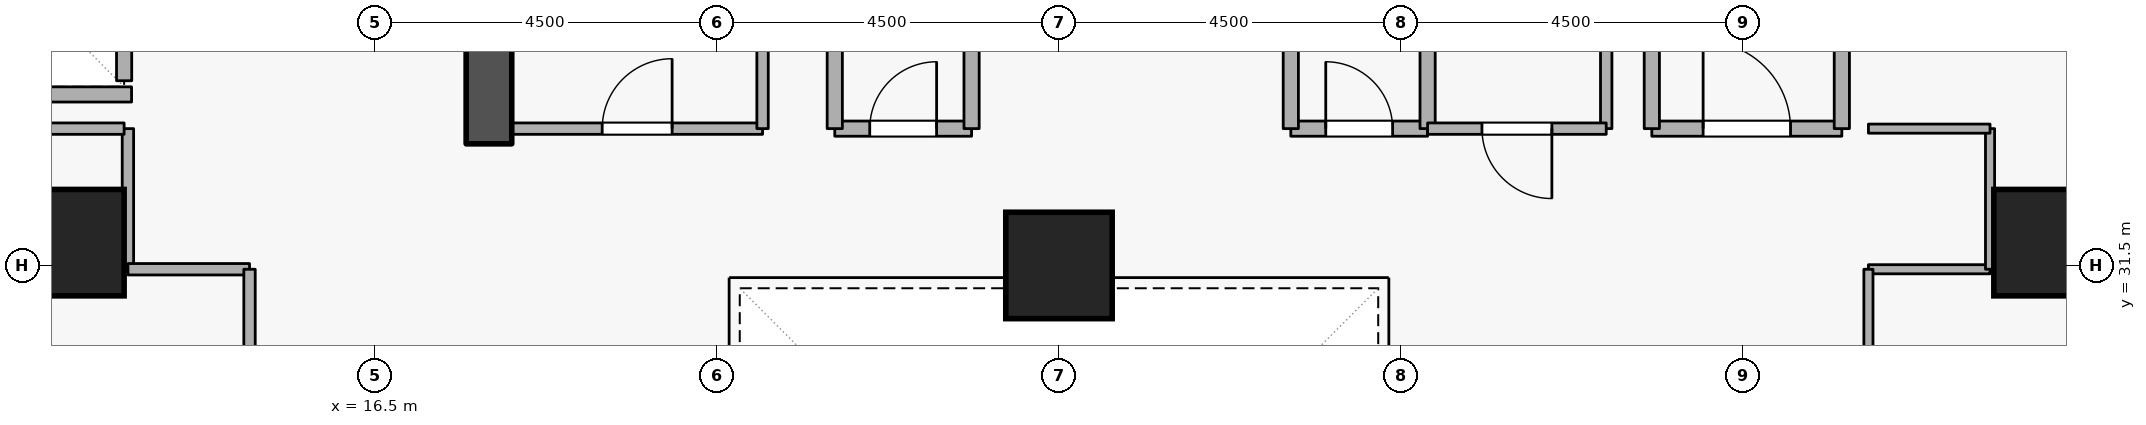
"""IFC4 building model, lengths in metres.
Left out: names, types, materials, properties, quantities, classifications, styles, units other than length and angle.
Written with IfcOpenShell. Run it as: python <this file> out.ifc"""

import sys

from ifc_helpers import new_model, si_unit, direction, frame, frame_2d, origin, origin_2d, place, context, subcontext, project, spatial, rectangle, extrude, element, fill, save


model = new_model("IFC4")
c1 = context("Model", 3, precision=1e-05, world=origin(), true_north=direction((0.0, 1.0)))
c2 = subcontext(c1, "Body", "Model", "MODEL_VIEW")
j1 = project(units=[si_unit("LENGTHUNIT", "METRE"), si_unit("PLANEANGLEUNIT", "RADIAN")], contexts=[c1])
p1 = place(None, origin())
s1 = spatial("IfcSite", under=j1, at=p1, CompositionType="ELEMENT")
p2 = place(p1, origin())
s2 = spatial("IfcBuilding", under=s1, at=p2, CompositionType="ELEMENT")
p3 = place(p2, frame((0.0, 0.0, 27.9)))
s3 = spatial("IfcBuildingStorey", under=s2, at=p3, CompositionType="ELEMENT", Elevation=27.9)
p4 = place(p3, frame((18.0, 33.1, 0.0), z_axis=(0.0, 0.0, 1.0), x_axis=(0.0, 1.0, 0.0)))
e1 = element("IfcWall", 1, at=p4, inside=s3, PredefinedType="SHEAR", context=c2, shape_type="SweptSolid", body=[
    extrude(rectangle(XDim=5.7, YDim=0.6, at=frame_2d((2.85, 0.0))), origin(), (0.0, 0.0, 1.0), 3.6),
])
for number, where, z_axis, x_axis in (
    (2, (12.5, 31.8, 0.0), (0.0, 0.0, 1.0), (1.0, 0.0, 0.0)),
    (3, (38.5, 31.8, 0.0), (0.0, 0.0, 1.0), (1.0, 0.0, 0.0)),
    (4, (25.5, 31.5, 0.0), (0.0, 0.0, 1.0), (1.0, 0.0, 0.0)),
):
    element("IfcColumn", number, at=place(p3, frame(where, z_axis=z_axis, x_axis=x_axis)), inside=s3, PredefinedType="COLUMN", context=c2, shape_type="SweptSolid", body=[
        extrude(rectangle(XDim=1.4, YDim=1.4, at=origin_2d()), origin(), (0.0, 0.0, 1.0), 3.6),
    ])
p5 = place(p3, frame((13.2, 33.93, 0.0), z_axis=(0.0, 0.0, 1.0), x_axis=(0.0, 1.0, 0.0)))
e5 = element("IfcWall", 5, at=p5, inside=s3, PredefinedType="STANDARD", context=c2, shape_type="SweptSolid", body=[
    extrude(rectangle(XDim=1.94, YDim=0.2, at=frame_2d((0.97, 0.0))), origin(), (0.0, 0.0, 1.0), 3.34),
])
p6 = place(p3, frame((11.002, 33.75, 0.0), z_axis=(0.0, 0.0, 1.0), x_axis=(1.0, 0.0, 0.0)))
e6 = element("IfcWall", 6, at=p6, inside=s3, PredefinedType="STANDARD", context=c2, shape_type="SweptSolid", body=[
    extrude(rectangle(XDim=2.296, YDim=0.2, at=frame_2d((1.148, 0.0))), origin(), (0.0, 0.0, 1.0), 3.34),
])
p7 = place(p3, frame((33.3, 33.3, 0.0), z_axis=(0.0, 0.0, 1.0), x_axis=(1.0, 0.0, 0.0)))
e7 = element("IfcWall", 7, at=p7, inside=s3, PredefinedType="STANDARD", context=c2, shape_type="SweptSolid", body=[
    extrude(rectangle(XDim=2.5, YDim=0.2, at=frame_2d((1.25, 0.0))), origin(), (0.0, 0.0, 1.0), 3.34),
])
p8 = place(p7, frame((0.675, 0.0, 0.0)))
e8 = element("IfcOpeningElement", 8, at=p8, cuts=e7, PredefinedType="OPENING", context=c2, shape_type="SweptSolid", body=[
    extrude(rectangle(XDim=1.15, YDim=2.1, at=frame_2d((0.575, 1.05))), frame((0.0, 0.11, 0.0), z_axis=(0.0, -1.0, 0.0), x_axis=(1.0, 0.0, 0.0)), (0.0, 0.0, 1.0), 0.22),
])
p9 = place(p3, frame((35.8, 33.3, 0.0), z_axis=(0.0, 0.0, 1.0), x_axis=(0.0, 1.0, 0.0)))
e9 = element("IfcWall", 9, at=p9, inside=s3, PredefinedType="STANDARD", context=c2, shape_type="SweptSolid", body=[
    extrude(rectangle(XDim=5.7, YDim=0.2, at=frame_2d((2.85, 0.0))), origin(), (0.0, 0.0, 1.0), 3.34),
])
p10 = place(p3, frame((33.3, 35.6, 0.0), z_axis=(0.0, 0.0, 1.0), x_axis=(0.0, -1.0, 0.0)))
e10 = element("IfcWall", 10, at=p10, inside=s3, PredefinedType="STANDARD", context=c2, shape_type="SweptSolid", body=[
    extrude(rectangle(XDim=2.3, YDim=0.2, at=frame_2d((1.15, 0.0))), origin(), (0.0, 0.0, 1.0), 2.545),
])
p11 = place(p3, frame((22.55, 33.3, 0.0), z_axis=(0.0, 0.0, 1.0), x_axis=(1.0, 0.0, 0.0)))
e11 = element("IfcWall", 11, at=p11, inside=s3, PredefinedType="STANDARD", context=c2, shape_type="SweptSolid", body=[
    extrude(rectangle(XDim=1.8, YDim=0.2, at=frame_2d((0.9, 0.0))), origin(), (0.0, 0.0, 1.0), 3.34),
])
p12 = place(p11, frame((0.46, 0.0, 0.0)))
e12 = element("IfcOpeningElement", 12, at=p12, cuts=e11, PredefinedType="OPENING", context=c2, shape_type="SweptSolid", body=[
    extrude(rectangle(XDim=0.88, YDim=2.04, at=frame_2d((0.44, 1.02))), frame((0.0, 0.11, 0.0), z_axis=(0.0, -1.0, 0.0), x_axis=(1.0, 0.0, 0.0)), (0.0, 0.0, 1.0), 0.22),
])
for number, where, z_axis, x_axis in (
    (13, (24.35, 33.3, 0.0), (0.0, 0.0, 1.0), (0.0, 1.0, 0.0)),
    (14, (22.55, 35.35, 0.0), (0.0, 0.0, 1.0), (0.0, -1.0, 0.0)),
):
    element("IfcWall", number, at=place(p3, frame(where, z_axis=z_axis, x_axis=x_axis)), inside=s3, PredefinedType="STANDARD", context=c2, shape_type="SweptSolid", body=[
        extrude(rectangle(XDim=2.05, YDim=0.2, at=frame_2d((1.025, 0.0))), origin(), (0.0, 0.0, 1.0), 3.34),
    ])
p13 = place(p3, frame((28.55, 33.3, 0.0), z_axis=(0.0, 0.0, 1.0), x_axis=(1.0, 0.0, 0.0)))
e15 = element("IfcWall", 15, at=p13, inside=s3, PredefinedType="STANDARD", context=c2, shape_type="SweptSolid", body=[
    extrude(rectangle(XDim=1.8, YDim=0.2, at=frame_2d((0.9, 0.0))), origin(), (0.0, 0.0, 1.0), 3.34),
])
p14 = place(p13, frame((0.46, 0.0, 0.0)))
e16 = element("IfcOpeningElement", 16, at=p14, cuts=e15, PredefinedType="OPENING", context=c2, shape_type="SweptSolid", body=[
    extrude(rectangle(XDim=0.88, YDim=2.04, at=frame_2d((0.44, 1.02))), frame((0.0, 0.11, 0.0), z_axis=(0.0, -1.0, 0.0), x_axis=(1.0, 0.0, 0.0)), (0.0, 0.0, 1.0), 0.22),
])
for number, where, z_axis, x_axis in (
    (17, (30.35, 33.3, 0.0), (0.0, 0.0, 1.0), (0.0, 1.0, 0.0)),
    (18, (28.55, 35.35, 0.0), (0.0, 0.0, 1.0), (0.0, -1.0, 0.0)),
):
    element("IfcWall", number, at=place(p3, frame(where, z_axis=z_axis, x_axis=x_axis)), inside=s3, PredefinedType="STANDARD", context=c2, shape_type="SweptSolid", body=[
        extrude(rectangle(XDim=2.05, YDim=0.2, at=frame_2d((1.025, 0.0))), origin(), (0.0, 0.0, 1.0), 3.34),
    ])
p15 = place(p3, frame((18.3, 33.3, 0.0), z_axis=(0.0, 0.0, 1.0), x_axis=(1.0, 0.0, 0.0)))
e19 = element("IfcWall", 19, at=p15, inside=s3, PredefinedType="PARTITIONING", context=c2, shape_type="SweptSolid", body=[
    extrude(rectangle(XDim=3.3, YDim=0.15, at=frame_2d((1.65, 0.0))), origin(), (0.0, 0.0, 1.0), 3.34),
])
p16 = place(p15, frame((1.19, 0.0, 0.0)))
e20 = element("IfcOpeningElement", 20, at=p16, cuts=e19, PredefinedType="OPENING", context=c2, shape_type="SweptSolid", body=[
    extrude(rectangle(XDim=0.92, YDim=2.08, at=frame_2d((0.46, 1.04))), frame((0.0, 0.085, 0.0), z_axis=(0.0, -1.0, 0.0), x_axis=(1.0, 0.0, 0.0)), (0.0, 0.0, 1.0), 0.17),
])
p17 = place(p3, frame((21.6, 33.3, 0.0), z_axis=(0.0, 0.0, 1.0), x_axis=(0.0, 1.0, 0.0)))
e21 = element("IfcWall", 21, at=p17, inside=s3, PredefinedType="PARTITIONING", context=c2, shape_type="SweptSolid", body=[
    extrude(rectangle(XDim=2.05, YDim=0.15, at=frame_2d((1.025, 0.0))), origin(), (0.0, 0.0, 1.0), 3.34),
])
p18 = place(p3, frame((32.7, 35.35, 0.0), z_axis=(0.0, 0.0, 1.0), x_axis=(0.0, -1.0, 0.0)))
e22 = element("IfcWall", 22, at=p18, inside=s3, PredefinedType="PARTITIONING", context=c2, shape_type="SweptSolid", body=[
    extrude(rectangle(XDim=2.05, YDim=0.15, at=frame_2d((1.025, 0.0))), origin(), (0.0, 0.0, 1.0), 2.545),
])
p19 = place(p3, frame((32.7, 33.3, 0.0), z_axis=(0.0, 0.0, 1.0), x_axis=(-1.0, 0.0, 0.0)))
e23 = element("IfcWall", 23, at=p19, inside=s3, PredefinedType="PARTITIONING", context=c2, shape_type="SweptSolid", body=[
    extrude(rectangle(XDim=2.35, YDim=0.15, at=frame_2d((1.175, 0.0))), origin(), (0.0, 0.0, 1.0), 3.34),
])
p20 = place(p19, frame((0.715, 0.0, 0.0)))
e24 = element("IfcOpeningElement", 24, at=p20, cuts=e23, PredefinedType="OPENING", context=c2, shape_type="SweptSolid", body=[
    extrude(rectangle(XDim=0.92, YDim=2.08, at=frame_2d((0.46, 1.04))), frame((0.0, 0.085, 0.0), z_axis=(0.0, -1.0, 0.0), x_axis=(1.0, 0.0, 0.0)), (0.0, 0.0, 1.0), 0.17),
])
p21 = place(p3, frame((13.25, 33.3, 0.0), z_axis=(0.0, 0.0, 1.0), x_axis=(0.0, -1.0, 0.0)))
e25 = element("IfcWall", 25, at=p21, inside=s3, PredefinedType="PARTITIONING", context=c2, shape_type="SweptSolid", body=[
    extrude(rectangle(XDim=1.85, YDim=0.15, at=frame_2d((0.925, 0.0))), origin(), (0.0, 0.0, 1.0), 3.34),
])
p22 = place(p3, frame((13.25, 31.45, 0.0), z_axis=(0.0, 0.0, 1.0), x_axis=(1.0, 0.0, 0.0)))
e26 = element("IfcWall", 26, at=p22, inside=s3, PredefinedType="PARTITIONING", context=c2, shape_type="SweptSolid", body=[
    extrude(rectangle(XDim=1.6, YDim=0.15, at=frame_2d((0.8, 0.0))), origin(), (0.0, 0.0, 1.0), 3.34),
])
p23 = place(p3, frame((14.85, 31.45, 0.0), z_axis=(0.0, 0.0, 1.0), x_axis=(0.0, -1.0, 0.0)))
e27 = element("IfcWall", 27, at=p23, inside=s3, PredefinedType="PARTITIONING", context=c2, shape_type="SweptSolid", body=[
    extrude(rectangle(XDim=4.45, YDim=0.15, at=frame_2d((2.225, 0.0))), origin(), (0.0, 0.0, 1.0), 3.34),
])
p24 = place(p23, frame((1.575, 0.0, 0.0)))
e28 = element("IfcOpeningElement", 28, at=p24, cuts=e27, PredefinedType="OPENING", context=c2, shape_type="SweptSolid", body=[
    extrude(rectangle(XDim=1.3, YDim=2.12, at=frame_2d((0.65, 1.06))), frame((0.0, 0.085, 0.0), z_axis=(0.0, -1.0, 0.0), x_axis=(1.0, 0.0, 0.0)), (0.0, 0.0, 1.0), 0.17),
])
p25 = place(p3, frame((10.9, 33.3, 0.0), z_axis=(0.0, 0.0, 1.0), x_axis=(1.0, 0.0, 0.0)))
e29 = element("IfcWall", 29, at=p25, inside=s3, PredefinedType="PARTITIONING", context=c2, shape_type="SweptSolid", body=[
    extrude(rectangle(XDim=2.3, YDim=0.15, at=frame_2d((1.15, 0.0))), origin(), (0.0, 0.0, 1.0), 3.34),
])
p26 = place(p3, frame((36.15, 31.45, 0.0), z_axis=(0.0, 0.0, 1.0), x_axis=(1.0, 0.0, 0.0)))
e30 = element("IfcWall", 30, at=p26, inside=s3, PredefinedType="PARTITIONING", context=c2, shape_type="SweptSolid", body=[
    extrude(rectangle(XDim=1.6, YDim=0.12, at=frame_2d((0.8, 0.0))), origin(), (0.0, 0.0, 1.0), 3.34),
])
p27 = place(p3, frame((37.75, 31.45, 0.0), z_axis=(0.0, 0.0, 1.0), x_axis=(0.0, 1.0, 0.0)))
e31 = element("IfcWall", 31, at=p27, inside=s3, PredefinedType="PARTITIONING", context=c2, shape_type="SweptSolid", body=[
    extrude(rectangle(XDim=1.85, YDim=0.12, at=frame_2d((0.925, 0.0))), origin(), (0.0, 0.0, 1.0), 3.34),
])
p28 = place(p3, frame((37.75, 33.3, 0.0), z_axis=(0.0, 0.0, 1.0), x_axis=(-1.0, 0.0, 0.0)))
e32 = element("IfcWall", 32, at=p28, inside=s3, PredefinedType="PARTITIONING", context=c2, shape_type="SweptSolid", body=[
    extrude(rectangle(XDim=1.6, YDim=0.12, at=frame_2d((0.8, 0.0))), origin(), (0.0, 0.0, 1.0), 3.34),
])
p29 = place(p3, frame((36.15, 27.0, 0.0), z_axis=(0.0, 0.0, 1.0), x_axis=(0.0, 1.0, 0.0)))
e33 = element("IfcWall", 33, at=p29, inside=s3, PredefinedType="PARTITIONING", context=c2, shape_type="SweptSolid", body=[
    extrude(rectangle(XDim=4.45, YDim=0.12, at=frame_2d((2.225, 0.0))), origin(), (0.0, 0.0, 1.0), 3.34),
])
p30 = place(p29, frame((1.7, 0.0, 0.0)))
e34 = element("IfcOpeningElement", 34, at=p30, cuts=e33, PredefinedType="OPENING", context=c2, shape_type="SweptSolid", body=[
    extrude(rectangle(XDim=1.05, YDim=2.1, at=frame_2d((0.525, 1.05))), frame((0.0, 0.07, 0.0), z_axis=(0.0, -1.0, 0.0), x_axis=(1.0, 0.0, 0.0)), (0.0, 0.0, 1.0), 0.14),
])
p31 = place(p8, origin())
e35 = element("IfcDoor", 35, at=p31, inside=s3, OperationType="SINGLE_SWING_LEFT", PredefinedType="DOOR", context=c2, shape_type="SweptSolid", body=[
    extrude(rectangle(XDim=1.15, YDim=2.1, at=frame_2d((0.575, 1.05))), frame((0.0, 0.025, 0.0), z_axis=(0.0, -1.0, 0.0), x_axis=(1.0, 0.0, 0.0)), (0.0, 0.0, 1.0), 0.05),
])
fill(e8, e35)
p32 = place(p12, origin())
e36 = element("IfcDoor", 36, at=p32, inside=s3, OperationType="SINGLE_SWING_RIGHT", PredefinedType="DOOR", context=c2, shape_type="SweptSolid", body=[
    extrude(rectangle(XDim=0.88, YDim=2.04, at=frame_2d((0.44, 1.02))), frame((0.0, 0.025, 0.0), z_axis=(0.0, -1.0, 0.0), x_axis=(1.0, 0.0, 0.0)), (0.0, 0.0, 1.0), 0.05),
])
fill(e12, e36)
p33 = place(p14, origin())
e37 = element("IfcDoor", 37, at=p33, inside=s3, OperationType="SINGLE_SWING_LEFT", PredefinedType="DOOR", context=c2, shape_type="SweptSolid", body=[
    extrude(rectangle(XDim=0.88, YDim=2.04, at=frame_2d((0.44, 1.02))), frame((0.0, 0.025, 0.0), z_axis=(0.0, -1.0, 0.0), x_axis=(1.0, 0.0, 0.0)), (0.0, 0.0, 1.0), 0.05),
])
fill(e16, e37)
p34 = place(p16, origin())
e38 = element("IfcDoor", 38, at=p34, inside=s3, OperationType="SINGLE_SWING_RIGHT", PredefinedType="DOOR", context=c2, shape_type="SweptSolid", body=[
    extrude(rectangle(XDim=0.92, YDim=2.08, at=frame_2d((0.46, 1.04))), frame((0.0, 0.025, 0.0), z_axis=(0.0, -1.0, 0.0), x_axis=(1.0, 0.0, 0.0)), (0.0, 0.0, 1.0), 0.05),
])
fill(e20, e38)
p35 = place(p20, origin())
e39 = element("IfcDoor", 39, at=p35, inside=s3, OperationType="SINGLE_SWING_LEFT", PredefinedType="DOOR", context=c2, shape_type="SweptSolid", body=[
    extrude(rectangle(XDim=0.92, YDim=2.08, at=frame_2d((0.46, 1.04))), frame((0.0, 0.025, 0.0), z_axis=(0.0, -1.0, 0.0), x_axis=(1.0, 0.0, 0.0)), (0.0, 0.0, 1.0), 0.05),
])
fill(e24, e39)
save(model, sys.argv[1])
